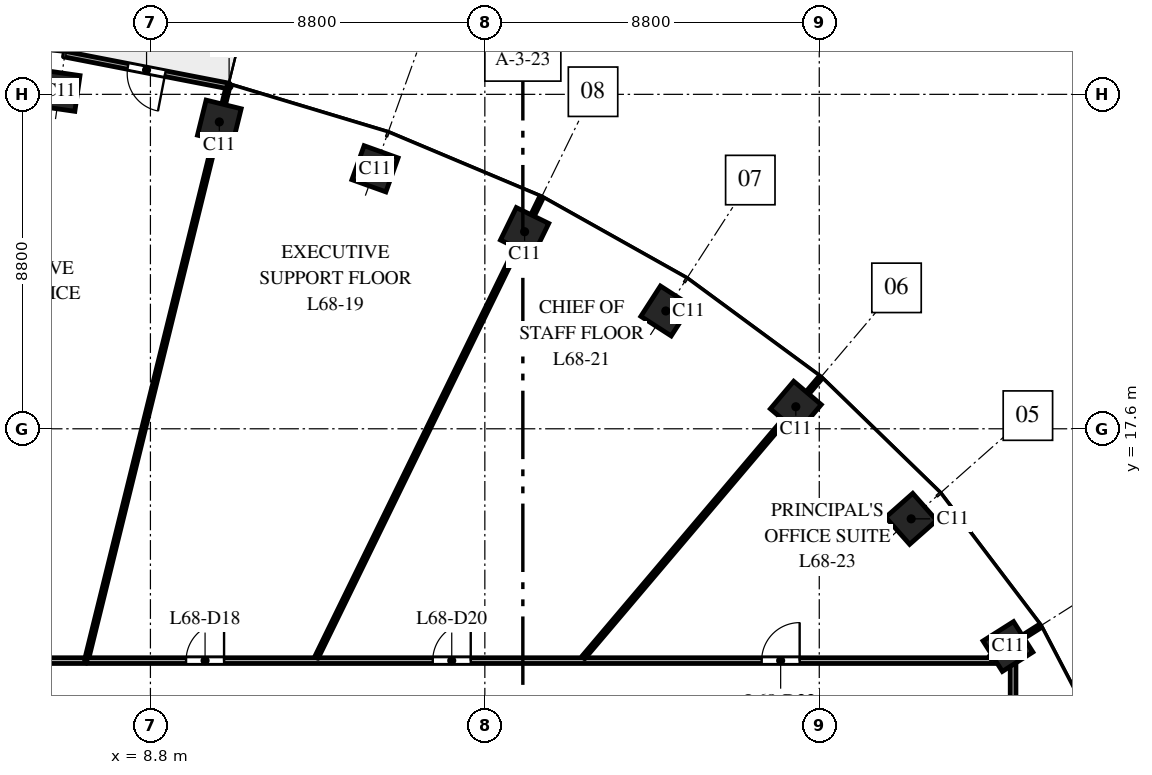
"""IFC4 building model, lengths in metres.
Left out: names, types, materials, properties, quantities, classifications, styles, units other than length and angle.
Written with IfcOpenShell. Run it as: python <this file> out.ifc"""

import sys

from ifc_helpers import new_model, si_unit, direction, frame, frame_2d, origin, origin_2d, place, context, subcontext, project, spatial, rectangle, extrude, element, fill, save


model = new_model("IFC4")
c1 = context("Model", 3, precision=1e-05, world=origin(), true_north=direction((0.0, 1.0)))
c2 = subcontext(c1, "Body", "Model", "MODEL_VIEW")
j1 = project(units=[si_unit("LENGTHUNIT", "METRE"), si_unit("PLANEANGLEUNIT", "RADIAN")], contexts=[c1])
p1 = place(None, origin())
s1 = spatial("IfcSite", under=j1, at=p1, CompositionType="ELEMENT")
p2 = place(p1, origin())
s2 = spatial("IfcBuilding", under=s1, at=p2, CompositionType="ELEMENT")
p3 = place(p2, frame((0.0, 0.0, 315.0)))
s3 = spatial("IfcBuildingStorey", under=s2, at=p3, CompositionType="ELEMENT", Elevation=315.0)
for number, where, z_axis, x_axis in (
    (1, (31.365, 11.871, 0.0), (0.0, 0.0, 1.0), (-0.535, 0.845, 0.0)),
    (2, (28.819, 15.23, 0.0), (0.0, 0.0, 1.0), (-0.663, 0.749, 0.0)),
    (3, (25.783, 18.18, 0.0), (0.0, 0.0, 1.0), (-0.763, 0.646, 0.0)),
    (4, (22.362, 20.7, 0.0), (0.0, 0.0, 1.0), (-0.84, 0.542, 0.0)),
    (5, (18.646, 22.785, 0.0), (0.0, 0.0, 1.0), (-0.898, 0.439, 0.0)),
    (6, (14.709, 24.441, 0.0), (0.0, 0.0, 1.0), (-0.941, 0.338, 0.0)),
    (7, (10.613, 25.674, 0.0), (0.0, 0.0, 1.0), (-0.971, 0.24, 0.0)),
    (8, (6.409, 26.491, 0.0), (0.0, 0.0, 1.0), (-0.99, 0.143, 0.0)),
):
    element("IfcColumn", number, at=place(p3, frame(where, z_axis=z_axis, x_axis=x_axis)), inside=s3, PredefinedType="COLUMN", context=c2, shape_type="SweptSolid", body=[
        extrude(rectangle(XDim=0.95, YDim=0.95, at=origin_2d()), origin(), (0.0, 0.0, 1.0), 4.0),
    ])
p4 = place(p3, frame((10.871, 26.617, 0.0), z_axis=(0.0, 0.0, 1.0), x_axis=(-0.981631174778, 0.190788460615, 0.0)))
e9 = element("IfcWall", 9, at=p4, inside=s3, PredefinedType="STANDARD", context=c2, shape_type="SweptSolid", body=[
    extrude(rectangle(XDim=4.426, YDim=0.15, at=frame_2d((2.213, 0.0))), origin(), (0.0, 0.0, 1.0), 3.7),
])
p5 = place(p4, frame((1.713, 0.0, 0.0)))
e10 = element("IfcOpeningElement", 10, at=p5, cuts=e9, PredefinedType="OPENING", context=c2, shape_type="SweptSolid", body=[
    extrude(rectangle(XDim=1.0, YDim=2.4, at=frame_2d((0.5, 1.2))), frame((0.0, 0.085, 0.0), z_axis=(0.0, -1.0, 0.0), x_axis=(1.0, 0.0, 0.0)), (0.0, 0.0, 1.0), 0.17),
])
p6 = place(p3, frame((1.403, 11.5, 0.0), z_axis=(0.0, 0.0, 1.0), x_axis=(1.0, 0.0, 0.0)))
e11 = element("IfcWall", 11, at=p6, inside=s3, PredefinedType="PARTITIONING", context=c2, shape_type="SweptSolid", body=[
    extrude(rectangle(XDim=5.709, YDim=0.15, at=frame_2d((2.854, 0.0))), origin(), (0.0, 0.0, 1.0), 2.85),
])
p7 = place(p6, frame((2.326, 0.0, 0.0)))
e12 = element("IfcOpeningElement", 12, at=p7, cuts=e11, PredefinedType="OPENING", context=c2, shape_type="SweptSolid", body=[
    extrude(rectangle(XDim=1.0, YDim=2.1, at=frame_2d((0.5, 1.05))), frame((0.0, 0.085, 0.0), z_axis=(0.0, -1.0, 0.0), x_axis=(1.0, 0.0, 0.0)), (0.0, 0.0, 1.0), 0.17),
])
p8 = place(p3, frame((7.113, 11.5, 0.0), z_axis=(0.0, 0.0, 1.0), x_axis=(0.239728816148, 0.970839891387, 0.0)))
e13 = element("IfcWall", 13, at=p8, inside=s3, PredefinedType="PARTITIONING", context=c2, shape_type="SweptSolid", body=[
    extrude(rectangle(XDim=15.601, YDim=0.1, at=frame_2d((7.8, 0.0))), origin(), (0.0, 0.0, 1.0), 2.85),
])
p9 = place(p3, frame((7.129, 11.5, 0.0), z_axis=(0.0, 0.0, 1.0), x_axis=(1.0, 0.0, 0.0)))
e14 = element("IfcWall", 14, at=p9, inside=s3, PredefinedType="PARTITIONING", context=c2, shape_type="SweptSolid", body=[
    extrude(rectangle(XDim=24.371, YDim=0.15, at=frame_2d((12.186, 0.0))), origin(), (0.0, 0.0, 1.0), 2.75),
])
p10 = place(p9, frame((2.609, 0.0, 0.0)))
e15 = element("IfcOpeningElement", 15, at=p10, cuts=e14, PredefinedType="OPENING", context=c2, shape_type="SweptSolid", body=[
    extrude(rectangle(XDim=1.0, YDim=2.1, at=frame_2d((0.5, 1.05))), frame((0.0, 0.085, 0.0), z_axis=(0.0, -1.0, 0.0), x_axis=(1.0, 0.0, 0.0)), (0.0, 0.0, 1.0), 0.17),
])
p11 = place(p9, frame((9.1, 0.0, 0.0)))
e16 = element("IfcOpeningElement", 16, at=p11, cuts=e14, PredefinedType="OPENING", context=c2, shape_type="SweptSolid", body=[
    extrude(rectangle(XDim=1.0, YDim=2.1, at=frame_2d((0.5, 1.05))), frame((0.0, 0.085, 0.0), z_axis=(0.0, -1.0, 0.0), x_axis=(1.0, 0.0, 0.0)), (0.0, 0.0, 1.0), 0.17),
])
p12 = place(p9, frame((17.755, 0.0, 0.0)))
e17 = element("IfcOpeningElement", 17, at=p12, cuts=e14, PredefinedType="OPENING", context=c2, shape_type="SweptSolid", body=[
    extrude(rectangle(XDim=1.0, YDim=2.1, at=frame_2d((0.5, 1.05))), frame((0.0, 0.085, 0.0), z_axis=(0.0, -1.0, 0.0), x_axis=(1.0, 0.0, 0.0)), (0.0, 0.0, 1.0), 0.17),
])
p13 = place(p3, frame((13.167, 11.579, 0.0), z_axis=(0.0, 0.0, 1.0), x_axis=(0.439238726833, 0.898370380661, 0.0)))
e18 = element("IfcWall", 18, at=p13, inside=s3, PredefinedType="PARTITIONING", context=c2, shape_type="SweptSolid", body=[
    extrude(rectangle(XDim=13.475, YDim=0.1, at=frame_2d((6.738, 0.0))), origin(), (0.0, 0.0, 1.0), 3.0),
])
p14 = place(p3, frame((20.189, 11.578, 0.0), z_axis=(0.0, 0.0, 1.0), x_axis=(0.646376264927, 0.763018822926, 0.0)))
e19 = element("IfcWall", 19, at=p14, inside=s3, PredefinedType="PARTITIONING", context=c2, shape_type="SweptSolid", body=[
    extrude(rectangle(XDim=9.655, YDim=0.1, at=frame_2d((4.828, 0.0))), origin(), (0.0, 0.0, 1.0), 3.0),
])
p15 = place(p3, frame((30.897, 11.575, 0.0), z_axis=(0.0, 0.0, 1.0), x_axis=(0.844757626245, 0.535149094086, 0.0)))
e20 = element("IfcWall", 20, at=p15, inside=s3, PredefinedType="PARTITIONING", context=c2, shape_type="SweptSolid", body=[
    extrude(rectangle(XDim=1.557, YDim=0.1, at=frame_2d((0.778, 0.0))), origin(), (0.0, 0.0, 1.0), 3.0),
])
p16 = place(p3, frame((31.5, 8.5, 0.0), z_axis=(0.0, 0.0, 1.0), x_axis=(0.0, 1.0, 0.0)))
e21 = element("IfcWall", 21, at=p16, inside=s3, PredefinedType="PARTITIONING", context=c2, shape_type="SweptSolid", body=[
    extrude(rectangle(XDim=3.0, YDim=0.15, at=frame_2d((1.5, 0.0))), origin(), (0.0, 0.0, 1.0), 3.0),
])
p17 = place(p16, frame((0.9, 0.0, 0.0)))
e22 = element("IfcOpeningElement", 22, at=p17, cuts=e21, PredefinedType="OPENING", context=c2, shape_type="SweptSolid", body=[
    extrude(rectangle(XDim=1.0, YDim=2.1, at=frame_2d((0.5, 1.05))), frame((0.0, 0.085, 0.0), z_axis=(0.0, -1.0, 0.0), x_axis=(1.0, 0.0, 0.0)), (0.0, 0.0, 1.0), 0.17),
])
p18 = place(p5, origin())
e23 = element("IfcDoor", 23, at=p18, inside=s3, OperationType="SINGLE_SWING_LEFT", PredefinedType="DOOR", context=c2, shape_type="SweptSolid", body=[
    extrude(rectangle(XDim=1.0, YDim=2.4, at=frame_2d((0.5, 1.2))), frame((0.0, 0.025, 0.0), z_axis=(0.0, -1.0, 0.0), x_axis=(1.0, 0.0, 0.0)), (0.0, 0.0, 1.0), 0.05),
])
fill(e10, e23)
p19 = place(p10, origin())
e24 = element("IfcDoor", 24, at=p19, inside=s3, OperationType="SINGLE_SWING_RIGHT", PredefinedType="DOOR", context=c2, shape_type="SweptSolid", body=[
    extrude(rectangle(XDim=1.0, YDim=2.1, at=frame_2d((0.5, 1.05))), frame((0.0, 0.025, 0.0), z_axis=(0.0, -1.0, 0.0), x_axis=(1.0, 0.0, 0.0)), (0.0, 0.0, 1.0), 0.05),
])
fill(e15, e24)
p20 = place(p11, origin())
e25 = element("IfcDoor", 25, at=p20, inside=s3, OperationType="SINGLE_SWING_RIGHT", PredefinedType="DOOR", context=c2, shape_type="SweptSolid", body=[
    extrude(rectangle(XDim=1.0, YDim=2.1, at=frame_2d((0.5, 1.05))), frame((0.0, 0.025, 0.0), z_axis=(0.0, -1.0, 0.0), x_axis=(1.0, 0.0, 0.0)), (0.0, 0.0, 1.0), 0.05),
])
fill(e16, e25)
p21 = place(p12, origin())
e26 = element("IfcDoor", 26, at=p21, inside=s3, OperationType="SINGLE_SWING_RIGHT", PredefinedType="DOOR", context=c2, shape_type="SweptSolid", body=[
    extrude(rectangle(XDim=1.0, YDim=2.1, at=frame_2d((0.5, 1.05))), frame((0.0, 0.025, 0.0), z_axis=(0.0, -1.0, 0.0), x_axis=(1.0, 0.0, 0.0)), (0.0, 0.0, 1.0), 0.05),
])
fill(e17, e26)
save(model, sys.argv[1])
